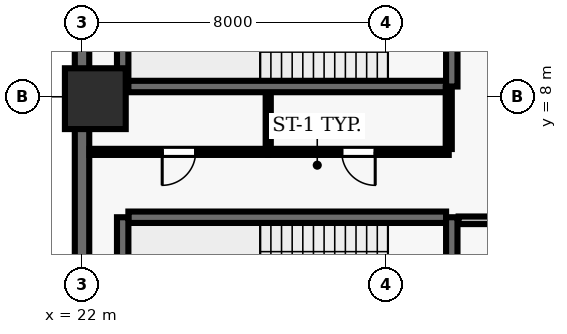
"""IFC4 building model, lengths in metres.
Left out: names, types, materials, properties, quantities, classifications, styles, units other than length and angle.
Written with IfcOpenShell. Run it as: python <this file> out.ifc"""

import sys

from ifc_helpers import new_model, si_unit, direction, frame, frame_2d, origin, origin_2d, place, context, subcontext, project, spatial, rectangle, extrude, element, fill, save


model = new_model("IFC4")
c1 = context("Model", 3, precision=1e-05, world=origin(), true_north=direction((0.0, 1.0)))
c2 = subcontext(c1, "Body", "Model", "MODEL_VIEW")
j1 = project(units=[si_unit("LENGTHUNIT", "METRE"), si_unit("PLANEANGLEUNIT", "RADIAN")], contexts=[c1])
p1 = place(None, origin())
s1 = spatial("IfcSite", under=j1, at=p1, CompositionType="ELEMENT")
p2 = place(p1, origin())
s2 = spatial("IfcBuilding", under=s1, at=p2, CompositionType="ELEMENT")
p3 = place(p2, frame((0.0, 0.0, -4.5)))
s3 = spatial("IfcBuildingStorey", under=s2, at=p3, CompositionType="ELEMENT", Elevation=-4.5)
p4 = place(p3, frame((22.35, 7.95, 0.0), z_axis=(0.0, 0.0, 1.0), x_axis=(1.0, 0.0, 0.0)))
e1 = element("IfcColumn", 1, at=p4, inside=s3, PredefinedType="COLUMN", context=c2, shape_type="SweptSolid", body=[
    extrude(rectangle(XDim=1.6, YDim=1.6, at=origin_2d()), origin(), (0.0, 0.0, 1.0), 4.5),
])
p5 = place(p3, frame((22.0, 51.5, 0.0), z_axis=(0.0, 0.0, 1.0), x_axis=(0.0, -1.0, 0.0)))
e2 = element("IfcWall", 2, at=p5, inside=s3, PredefinedType="USERDEFINED", context=c2, shape_type="SweptSolid", body=[
    extrude(rectangle(XDim=49.0, YDim=0.38, at=frame_2d((24.5, 0.0))), origin(), (0.0, 0.0, 1.0), 4.22),
])
p6 = place(p3, frame((31.58, 4.83, 0.0), z_axis=(0.0, 0.0, 1.0), x_axis=(-1.0, 0.0, 0.0)))
e3 = element("IfcWall", 3, at=p6, inside=s3, PredefinedType="SHEAR", context=c2, shape_type="SweptSolid", body=[
    extrude(rectangle(XDim=8.36, YDim=0.3, at=frame_2d((4.18, 0.0))), origin(), (0.0, 0.0, 1.0), 4.22),
])
p7 = place(p3, frame((23.07, 4.83, 0.0), z_axis=(0.0, 0.0, 1.0), x_axis=(0.0, -1.0, 0.0)))
e4 = element("IfcWall", 4, at=p7, inside=s3, PredefinedType="SHEAR", context=c2, shape_type="SweptSolid", body=[
    extrude(rectangle(XDim=3.51, YDim=0.3, at=frame_2d((1.755, 0.0))), origin(), (0.0, 0.0, 1.0), 4.22),
])
p8 = place(p3, frame((31.73, 0.96, 0.0), z_axis=(0.0, 0.0, 1.0), x_axis=(0.0, 1.0, 0.0)))
e5 = element("IfcWall", 5, at=p8, inside=s3, PredefinedType="SHEAR", context=c2, shape_type="SweptSolid", body=[
    extrude(rectangle(XDim=3.87, YDim=0.3, at=frame_2d((1.935, 0.0))), origin(), (0.0, 0.0, 1.0), 4.22),
])
p9 = place(p8, frame((1.54, 0.0, 0.0)))
e6 = element("IfcOpeningElement", 6, at=p9, cuts=e5, PredefinedType="OPENING", context=c2, shape_type="SweptSolid", body=[
    extrude(rectangle(XDim=1.15, YDim=2.15, at=frame_2d((0.575, 1.075))), frame((0.0, 0.16, 0.0), z_axis=(0.0, -1.0, 0.0), x_axis=(1.0, 0.0, 0.0)), (0.0, 0.0, 1.0), 0.32),
])
p10 = place(p3, frame((23.07, 11.78, 0.0), z_axis=(0.0, 0.0, 1.0), x_axis=(0.0, -1.0, 0.0)))
e7 = element("IfcWall", 7, at=p10, inside=s3, PredefinedType="SHEAR", context=c2, shape_type="SweptSolid", body=[
    extrude(rectangle(XDim=3.51, YDim=0.3, at=frame_2d((1.755, 0.0))), origin(), (0.0, 0.0, 1.0), 4.22),
])
p11 = place(p3, frame((23.22, 8.27, 0.0), z_axis=(0.0, 0.0, 1.0), x_axis=(1.0, 0.0, 0.0)))
e8 = element("IfcWall", 8, at=p11, inside=s3, PredefinedType="SHEAR", context=c2, shape_type="SweptSolid", body=[
    extrude(rectangle(XDim=8.36, YDim=0.3, at=frame_2d((4.18, 0.0))), origin(), (0.0, 0.0, 1.0), 4.22),
])
p12 = place(p3, frame((31.73, 8.27, 0.0), z_axis=(0.0, 0.0, 1.0), x_axis=(0.0, 1.0, 0.0)))
e9 = element("IfcWall", 9, at=p12, inside=s3, PredefinedType="SHEAR", context=c2, shape_type="SweptSolid", body=[
    extrude(rectangle(XDim=3.51, YDim=0.3, at=frame_2d((1.755, 0.0))), origin(), (0.0, 0.0, 1.0), 4.22),
])
p13 = place(p12, frame((1.18, 0.0, 0.0)))
e10 = element("IfcOpeningElement", 10, at=p13, cuts=e9, PredefinedType="OPENING", context=c2, shape_type="SweptSolid", body=[
    extrude(rectangle(XDim=1.15, YDim=2.15, at=frame_2d((0.575, 1.075))), frame((0.0, 0.16, 0.0), z_axis=(0.0, -1.0, 0.0), x_axis=(1.0, 0.0, 0.0)), (0.0, 0.0, 1.0), 0.32),
])
p14 = place(p3, frame((26.9, 6.55, 0.0), z_axis=(0.0, 0.0, 1.0), x_axis=(-1.0, 0.0, 0.0)))
e11 = element("IfcWall", 11, at=p14, inside=s3, PredefinedType="PARTITIONING", context=c2, shape_type="SweptSolid", body=[
    extrude(rectangle(XDim=4.7, YDim=0.16, at=frame_2d((2.35, 0.0))), origin(), (0.0, 0.0, 1.0), 4.22),
])
p15 = place(p14, frame((1.91, 0.0, 0.0)))
e12 = element("IfcOpeningElement", 12, at=p15, cuts=e11, PredefinedType="OPENING", context=c2, shape_type="SweptSolid", body=[
    extrude(rectangle(XDim=0.88, YDim=2.1, at=frame_2d((0.44, 1.05))), frame((0.0, 0.09, 0.0), z_axis=(0.0, -1.0, 0.0), x_axis=(1.0, 0.0, 0.0)), (0.0, 0.0, 1.0), 0.18),
])
p16 = place(p3, frame((31.65, 6.55, 0.0), z_axis=(0.0, 0.0, 1.0), x_axis=(-1.0, 0.0, 0.0)))
e13 = element("IfcWall", 13, at=p16, inside=s3, PredefinedType="PARTITIONING", context=c2, shape_type="SweptSolid", body=[
    extrude(rectangle(XDim=4.75, YDim=0.16, at=frame_2d((2.375, 0.0))), origin(), (0.0, 0.0, 1.0), 4.22),
])
p17 = place(p16, frame((1.935, 0.0, 0.0)))
e14 = element("IfcOpeningElement", 14, at=p17, cuts=e13, PredefinedType="OPENING", context=c2, shape_type="SweptSolid", body=[
    extrude(rectangle(XDim=0.88, YDim=2.1, at=frame_2d((0.44, 1.05))), frame((0.0, 0.09, 0.0), z_axis=(0.0, -1.0, 0.0), x_axis=(1.0, 0.0, 0.0)), (0.0, 0.0, 1.0), 0.18),
])
p18 = place(p3, frame((35.02, 4.75, 0.0), z_axis=(0.0, 0.0, 1.0), x_axis=(-1.0, 0.0, 0.0)))
e15 = element("IfcWall", 15, at=p18, inside=s3, PredefinedType="SOLIDWALL", context=c2, shape_type="SweptSolid", body=[
    extrude(rectangle(XDim=3.11, YDim=0.2, at=frame_2d((1.555, 0.0))), origin(), (0.0, 0.0, 1.0), 4.22),
])
p19 = place(p18, frame((1.03, 0.0, 0.0)))
e16 = element("IfcOpeningElement", 16, at=p19, cuts=e15, PredefinedType="OPENING", context=c2, shape_type="SweptSolid", body=[
    extrude(rectangle(XDim=1.05, YDim=2.15, at=frame_2d((0.525, 1.075))), frame((0.0, 0.11, 0.0), z_axis=(0.0, -1.0, 0.0), x_axis=(1.0, 0.0, 0.0)), (0.0, 0.0, 1.0), 0.22),
])
p20 = place(p3, frame((26.9, 6.625, 0.0), z_axis=(0.0, 0.0, 1.0), x_axis=(0.0, 1.0, 0.0)))
e17 = element("IfcWall", 17, at=p20, inside=s3, PredefinedType="PARTITIONING", context=c2, shape_type="SweptSolid", body=[
    extrude(rectangle(XDim=1.465, YDim=0.135, at=frame_2d((0.732, 0.0))), origin(), (0.0, 0.0, 1.0), 4.22),
])
p21 = place(p3, frame((31.65, 8.24, 0.0), z_axis=(0.0, 0.0, 1.0), x_axis=(0.0, -1.0, 0.0)))
e18 = element("IfcWall", 18, at=p21, inside=s3, PredefinedType="PARTITIONING", context=c2, shape_type="SweptSolid", body=[
    extrude(rectangle(XDim=1.615, YDim=0.16, at=frame_2d((0.808, 0.0))), origin(), (0.0, 0.0, 1.0), 4.22),
])
p22 = place(p15, origin())
e19 = element("IfcDoor", 19, at=p22, inside=s3, OperationType="SINGLE_SWING_RIGHT", PredefinedType="DOOR", context=c2, shape_type="SweptSolid", body=[
    extrude(rectangle(XDim=0.88, YDim=2.1, at=frame_2d((0.44, 1.05))), frame((0.0, 0.025, 0.0), z_axis=(0.0, -1.0, 0.0), x_axis=(1.0, 0.0, 0.0)), (0.0, 0.0, 1.0), 0.05),
])
fill(e12, e19)
p23 = place(p17, origin())
e20 = element("IfcDoor", 20, at=p23, inside=s3, OperationType="SINGLE_SWING_LEFT", PredefinedType="DOOR", context=c2, shape_type="SweptSolid", body=[
    extrude(rectangle(XDim=0.88, YDim=2.1, at=frame_2d((0.44, 1.05))), frame((0.0, 0.025, 0.0), z_axis=(0.0, -1.0, 0.0), x_axis=(1.0, 0.0, 0.0)), (0.0, 0.0, 1.0), 0.05),
])
fill(e14, e20)
save(model, sys.argv[1])
